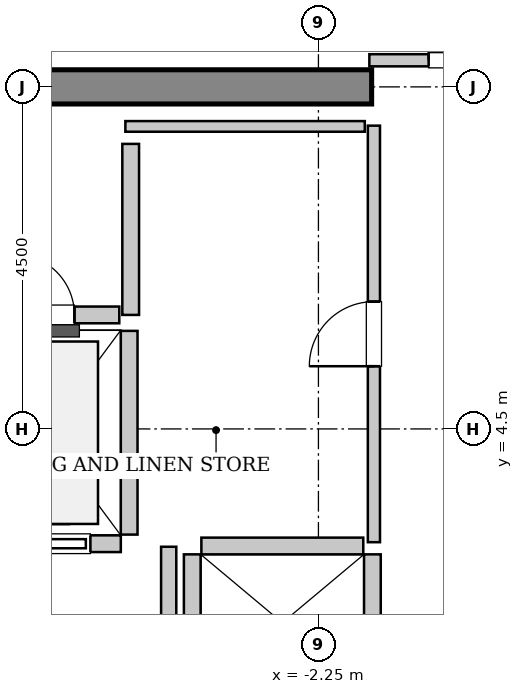
"""IFC4 building model, lengths in metres.
Left out: names, types, materials, properties, quantities, classifications, styles, units other than length and angle.
Written with IfcOpenShell. Run it as: python <this file> out.ifc"""

import sys

from ifc_helpers import new_model, si_unit, direction, frame, frame_2d, origin, place, context, subcontext, project, spatial, rectangle, extrude, source, transform, mapped, element, fill, save


model = new_model("IFC4")
c1 = context("Model", 3, precision=1e-05, world=origin(), true_north=direction((0.0, 1.0)))
c2 = subcontext(c1, "Body", "Model", "MODEL_VIEW")
j1 = project(units=[si_unit("LENGTHUNIT", "METRE"), si_unit("PLANEANGLEUNIT", "RADIAN")], contexts=[c1])
p1 = place(None, origin())
s1 = spatial("IfcSite", under=j1, at=p1, CompositionType="ELEMENT")
p2 = place(p1, origin())
s2 = spatial("IfcBuilding", under=s1, at=p2, CompositionType="ELEMENT")
p3 = place(p2, frame((0.0, 0.0, 229.4)))
s3 = spatial("IfcBuildingStorey", under=s2, at=p3, CompositionType="ELEMENT", Elevation=229.4)
m1 = source(origin(), c2, "Body", "SweptSolid", [
    extrude(rectangle(XDim=9.925, YDim=0.45, at=frame_2d((4.962, 0.0))), origin(), (0.0, 0.0, 1.0), 3.8),
])
p4 = place(p3, frame((-11.475, 9.0, 0.0), z_axis=(0.0, 0.0, 1.0), x_axis=(1.0, 0.0, 0.0)))
e1 = element("IfcWall", 1, at=p4, inside=s3, PredefinedType="SHEAR", context=c2, shape_type="MappedRepresentation", body=[
    mapped(m1, transform((0.0, 0.0, 0.0), x_axis=(1.0, 0.0, 0.0), y_axis=(0.0, 1.0, 0.0), z_axis=(0.0, 0.0, 1.0), scale=1.0)),
])
m2 = source(origin(), c2, "Body", "SweptSolid", [
    extrude(rectangle(XDim=2.0, YDim=0.22, at=frame_2d((1.0, 0.0))), origin(), (0.0, 0.0, 1.0), 3.535),
])
p5 = place(p3, frame((-6.85, 2.99, 0.0), z_axis=(0.0, 0.0, 1.0), x_axis=(1.0, 0.0, 0.0)))
e2 = element("IfcWall", 2, at=p5, inside=s3, PredefinedType="SOLIDWALL", context=c2, shape_type="MappedRepresentation", body=[
    mapped(m2, transform((0.0, 0.0, 0.0), x_axis=(1.0, 0.0, 0.0), y_axis=(0.0, 1.0, 0.0), z_axis=(0.0, 0.0, 1.0), scale=1.0)),
])
p6 = place(p5, frame((0.4, 0.0, 0.0)))
e3 = element("IfcOpeningElement", 3, at=p6, cuts=e2, PredefinedType="OPENING", context=c2, shape_type="SweptSolid", body=[
    extrude(rectangle(XDim=1.2, YDim=2.2, at=frame_2d((0.6, 1.1))), frame((0.0, 0.12, 0.0), z_axis=(0.0, -1.0, 0.0), x_axis=(1.0, 0.0, 0.0)), (0.0, 0.0, 1.0), 0.24),
])
m3 = source(origin(), c2, "Body", "SweptSolid", [
    extrude(rectangle(XDim=2.68, YDim=0.22, at=frame_2d((1.34, 0.0))), origin(), (0.0, 0.0, 1.0), 3.535),
])
p7 = place(p3, frame((-4.74, 3.11, 0.0), z_axis=(0.0, 0.0, 1.0), x_axis=(0.0, 1.0, 0.0)))
e4 = element("IfcWall", 4, at=p7, inside=s3, PredefinedType="SOLIDWALL", context=c2, shape_type="MappedRepresentation", body=[
    mapped(m3, transform((0.0, 0.0, 0.0), x_axis=(1.0, 0.0, 0.0), y_axis=(0.0, 1.0, 0.0), z_axis=(0.0, 0.0, 1.0), scale=1.0)),
])
m4 = source(origin(), c2, "Body", "SweptSolid", [
    extrude(rectangle(XDim=5.7, YDim=0.22, at=frame_2d((2.85, 0.0))), origin(), (0.0, 0.0, 1.0), 3.535),
])
for number, where, z_axis, x_axis in (
    (5, (-1.54, -2.85, 0.0), (0.0, 0.0, 1.0), (0.0, 1.0, 0.0)),
    (6, (-3.91, 2.85, 0.0), (0.0, 0.0, 1.0), (0.0, -1.0, 0.0)),
):
    element("IfcWall", number, at=place(p3, frame(where, z_axis=z_axis, x_axis=x_axis)), inside=s3, PredefinedType="SOLIDWALL", context=c2, shape_type="MappedRepresentation", body=[
        mapped(m4, transform((0.0, 0.0, 0.0), x_axis=(1.0, 0.0, 0.0), y_axis=(0.0, 1.0, 0.0), z_axis=(0.0, 0.0, 1.0), scale=1.0)),
    ])
m5 = source(origin(), c2, "Body", "SweptSolid", [
    extrude(rectangle(XDim=2.13, YDim=0.22, at=frame_2d((1.065, 0.0))), origin(), (0.0, 0.0, 1.0), 3.535),
])
p8 = place(p3, frame((-1.66, 2.96, 0.0), z_axis=(0.0, 0.0, 1.0), x_axis=(-1.0, 0.0, 0.0)))
e7 = element("IfcWall", 7, at=p8, inside=s3, PredefinedType="SOLIDWALL", context=c2, shape_type="MappedRepresentation", body=[
    mapped(m5, transform((0.0, 0.0, 0.0), x_axis=(1.0, 0.0, 0.0), y_axis=(0.0, 1.0, 0.0), z_axis=(0.0, 0.0, 1.0), scale=1.0)),
])
m6 = source(origin(), c2, "Body", "SweptSolid", [
    extrude(rectangle(XDim=2.25, YDim=0.22, at=frame_2d((1.125, 0.0))), origin(), (0.0, 0.0, 1.0), 3.535),
])
p9 = place(p3, frame((-4.72, 6.0, 0.0), z_axis=(0.0, 0.0, 1.0), x_axis=(0.0, 1.0, 0.0)))
e8 = element("IfcWall", 8, at=p9, inside=s3, PredefinedType="SOLIDWALL", context=c2, shape_type="MappedRepresentation", body=[
    mapped(m6, transform((0.0, 0.0, 0.0), x_axis=(1.0, 0.0, 0.0), y_axis=(0.0, 1.0, 0.0), z_axis=(0.0, 0.0, 1.0), scale=1.0)),
])
m7 = source(origin(), c2, "Body", "SweptSolid", [
    extrude(rectangle(XDim=1.98, YDim=0.22, at=frame_2d((0.99, 0.0))), origin(), (0.0, 0.0, 1.0), 3.535),
])
p10 = place(p3, frame((-6.85, 6.0, 0.0), z_axis=(0.0, 0.0, 1.0), x_axis=(1.0, 0.0, 0.0)))
e9 = element("IfcWall", 9, at=p10, inside=s3, PredefinedType="SOLIDWALL", context=c2, shape_type="MappedRepresentation", body=[
    mapped(m7, transform((0.0, 0.0, 0.0), x_axis=(1.0, 0.0, 0.0), y_axis=(0.0, 1.0, 0.0), z_axis=(0.0, 0.0, 1.0), scale=1.0)),
])
p11 = place(p10, frame((0.59, 0.0, 0.0)))
e10 = element("IfcOpeningElement", 10, at=p11, cuts=e9, PredefinedType="OPENING", context=c2, shape_type="SweptSolid", body=[
    extrude(rectangle(XDim=0.8, YDim=2.0, at=frame_2d((0.4, 1.0))), frame((0.0, 0.12, 0.0), z_axis=(0.0, -1.0, 0.0), x_axis=(1.0, 0.0, 0.0)), (0.0, 0.0, 1.0), 0.24),
])
m8 = source(origin(), c2, "Body", "SweptSolid", [
    extrude(rectangle(XDim=5.9, YDim=0.2, at=frame_2d((2.95, 0.0))), origin(), (0.0, 0.0, 1.0), 3.535),
])
p12 = place(p3, frame((-4.22, -2.95, 0.0), z_axis=(0.0, 0.0, 1.0), x_axis=(0.0, 1.0, 0.0)))
e11 = element("IfcWall", 11, at=p12, inside=s3, PredefinedType="PARTITIONING", context=c2, shape_type="MappedRepresentation", body=[
    mapped(m8, transform((0.0, 0.0, 0.0), x_axis=(1.0, 0.0, 0.0), y_axis=(0.0, 1.0, 0.0), z_axis=(0.0, 0.0, 1.0), scale=1.0)),
])
m9 = source(origin(), c2, "Body", "SweptSolid", [
    extrude(rectangle(XDim=3.16, YDim=0.16, at=frame_2d((1.58, 0.0))), origin(), (0.0, 0.0, 1.0), 2.625),
])
p13 = place(p3, frame((-1.58, 9.35, 0.0), z_axis=(0.0, 0.0, 1.0), x_axis=(1.0, 0.0, 0.0)))
e12 = element("IfcWall", 12, at=p13, inside=s3, PredefinedType="PARTITIONING", context=c2, shape_type="MappedRepresentation", body=[
    mapped(m9, transform((0.0, 0.0, 0.0), x_axis=(1.0, 0.0, 0.0), y_axis=(0.0, 1.0, 0.0), z_axis=(0.0, 0.0, 1.0), scale=1.0)),
])
p14 = place(p13, frame((0.78, 0.0, 0.0)))
e13 = element("IfcOpeningElement", 13, at=p14, cuts=e12, PredefinedType="OPENING", context=c2, shape_type="SweptSolid", body=[
    extrude(rectangle(XDim=1.6, YDim=2.3, at=frame_2d((0.8, 1.15))), frame((0.0, 0.09, 0.0), z_axis=(0.0, -1.0, 0.0), x_axis=(1.0, 0.0, 0.0)), (0.0, 0.0, 1.0), 0.18),
])
m10 = source(origin(), c2, "Body", "SweptSolid", [
    extrude(rectangle(XDim=5.48, YDim=0.16, at=frame_2d((2.74, 0.0))), origin(), (0.0, 0.0, 1.0), 3.535),
])
p15 = place(p3, frame((-1.52, 3.01, 0.0), z_axis=(0.0, 0.0, 1.0), x_axis=(0.0, 1.0, 0.0)))
e14 = element("IfcWall", 14, at=p15, inside=s3, PredefinedType="PARTITIONING", context=c2, shape_type="MappedRepresentation", body=[
    mapped(m10, transform((0.0, 0.0, 0.0), x_axis=(1.0, 0.0, 0.0), y_axis=(0.0, 1.0, 0.0), z_axis=(0.0, 0.0, 1.0), scale=1.0)),
])
p16 = place(p15, frame((2.315, 0.0, 0.0)))
e15 = element("IfcOpeningElement", 15, at=p16, cuts=e14, PredefinedType="OPENING", context=c2, shape_type="SweptSolid", body=[
    extrude(rectangle(XDim=0.85, YDim=2.1, at=frame_2d((0.425, 1.05))), frame((0.0, 0.09, 0.0), z_axis=(0.0, -1.0, 0.0), x_axis=(1.0, 0.0, 0.0)), (0.0, 0.0, 1.0), 0.18),
])
m11 = source(origin(), c2, "Body", "SweptSolid", [
    extrude(rectangle(XDim=3.15, YDim=0.14, at=frame_2d((1.575, 0.0))), origin(), (0.0, 0.0, 1.0), 3.535),
])
p17 = place(p3, frame((-4.79, 8.48, 0.0), z_axis=(0.0, 0.0, 1.0), x_axis=(1.0, 0.0, 0.0)))
e16 = element("IfcWall", 16, at=p17, inside=s3, PredefinedType="PARTITIONING", context=c2, shape_type="MappedRepresentation", body=[
    mapped(m11, transform((0.0, 0.0, 0.0), x_axis=(1.0, 0.0, 0.0), y_axis=(0.0, 1.0, 0.0), z_axis=(0.0, 0.0, 1.0), scale=1.0)),
])
m12 = source(origin(), c2, "Body", "SweptSolid", [
    extrude(rectangle(XDim=1.2, YDim=2.2, at=frame_2d((0.6, 1.1))), frame((0.0, 0.025, 0.0), z_axis=(0.0, -1.0, 0.0), x_axis=(1.0, 0.0, 0.0)), (0.0, 0.0, 1.0), 0.05),
])
p18 = place(p6, origin())
e17 = element("IfcDoor", 17, at=p18, inside=s3, OperationType="SLIDING_TO_LEFT", PredefinedType="DOOR", context=c2, shape_type="MappedRepresentation", body=[
    mapped(m12, transform((0.0, 0.0, 0.0), x_axis=(1.0, 0.0, 0.0), y_axis=(0.0, 1.0, 0.0), z_axis=(0.0, 0.0, 1.0), scale=1.0)),
])
fill(e3, e17)
m13 = source(origin(), c2, "Body", "SweptSolid", [
    extrude(rectangle(XDim=0.8, YDim=2.0, at=frame_2d((0.4, 1.0))), frame((0.0, 0.025, 0.0), z_axis=(0.0, -1.0, 0.0), x_axis=(1.0, 0.0, 0.0)), (0.0, 0.0, 1.0), 0.05),
])
p19 = place(p11, origin())
e18 = element("IfcDoor", 18, at=p19, inside=s3, OperationType="SINGLE_SWING_LEFT", PredefinedType="TRAPDOOR", context=c2, shape_type="MappedRepresentation", body=[
    mapped(m13, transform((0.0, 0.0, 0.0), x_axis=(1.0, 0.0, 0.0), y_axis=(0.0, 1.0, 0.0), z_axis=(0.0, 0.0, 1.0), scale=1.0)),
])
fill(e10, e18)
m14 = source(origin(), c2, "Body", "SweptSolid", [
    extrude(rectangle(XDim=1.6, YDim=2.3, at=frame_2d((0.8, 1.15))), frame((0.0, 0.025, 0.0), z_axis=(0.0, -1.0, 0.0), x_axis=(1.0, 0.0, 0.0)), (0.0, 0.0, 1.0), 0.05),
])
p20 = place(p14, origin())
e19 = element("IfcDoor", 19, at=p20, inside=s3, OperationType="DOUBLE_DOOR_SINGLE_SWING", PredefinedType="DOOR", context=c2, shape_type="MappedRepresentation", body=[
    mapped(m14, transform((0.0, 0.0, 0.0), x_axis=(1.0, 0.0, 0.0), y_axis=(0.0, 1.0, 0.0), z_axis=(0.0, 0.0, 1.0), scale=1.0)),
])
fill(e13, e19)
m15 = source(origin(), c2, "Body", "SweptSolid", [
    extrude(rectangle(XDim=0.85, YDim=2.1, at=frame_2d((0.425, 1.05))), frame((0.0, 0.025, 0.0), z_axis=(0.0, -1.0, 0.0), x_axis=(1.0, 0.0, 0.0)), (0.0, 0.0, 1.0), 0.05),
])
p21 = place(p16, origin())
e20 = element("IfcDoor", 20, at=p21, inside=s3, OperationType="SINGLE_SWING_LEFT", PredefinedType="DOOR", context=c2, shape_type="MappedRepresentation", body=[
    mapped(m15, transform((0.0, 0.0, 0.0), x_axis=(1.0, 0.0, 0.0), y_axis=(0.0, 1.0, 0.0), z_axis=(0.0, 0.0, 1.0), scale=1.0)),
])
fill(e15, e20)
save(model, sys.argv[1])
